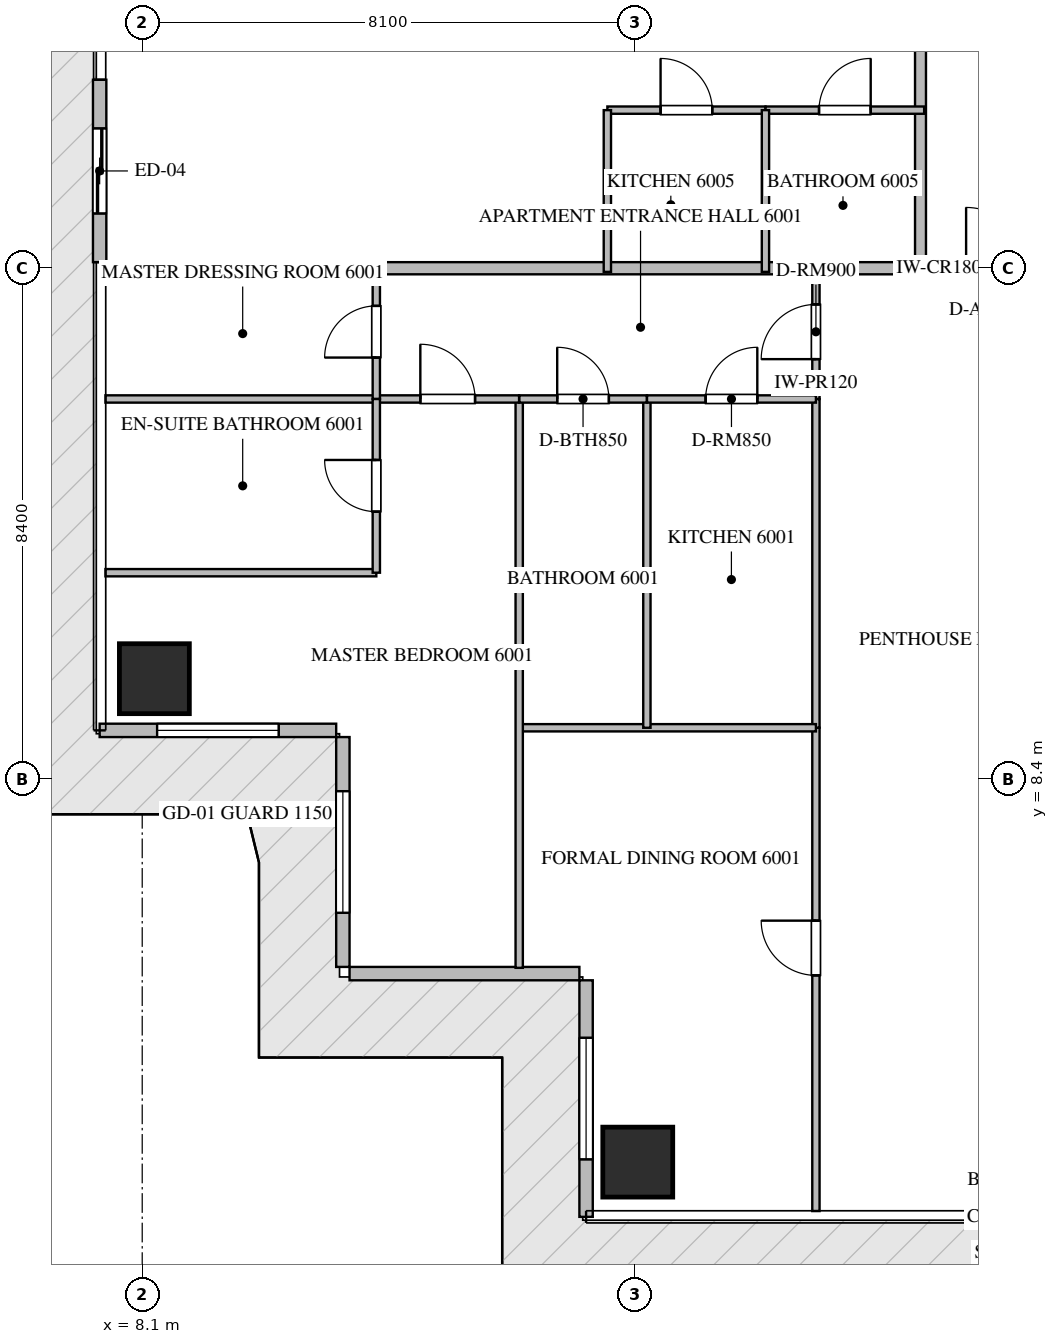
"""IFC4 building model, lengths in metres.
Left out: names, types, materials, properties, quantities, classifications, styles, units other than length and angle.
Written with IfcOpenShell. Run it as: python <this file> out.ifc"""

import sys

from ifc_helpers import new_model, si_unit, direction, frame, frame_2d, origin, origin_2d, place, context, subcontext, project, spatial, rectangle, extrude, source, transform, mapped, element, fill, save


model = new_model("IFC4")
c1 = context("Model", 3, precision=1e-05, world=origin(), true_north=direction((0.0, 1.0)))
c2 = subcontext(c1, "Body", "Model", "MODEL_VIEW")
j1 = project(units=[si_unit("LENGTHUNIT", "METRE"), si_unit("PLANEANGLEUNIT", "RADIAN")], contexts=[c1])
p1 = place(None, origin())
s1 = spatial("IfcSite", under=j1, at=p1, CompositionType="ELEMENT")
p2 = place(p1, origin())
s2 = spatial("IfcBuilding", under=s1, at=p2, CompositionType="ELEMENT")
p3 = place(p2, frame((0.0, 0.0, 241.25)))
s3 = spatial("IfcBuildingStorey", under=s2, at=p3, CompositionType="ELEMENT", Elevation=241.25)
m1 = source(origin(), c2, "Body", "SweptSolid", [
    extrude(rectangle(XDim=1.15, YDim=1.15, at=origin_2d()), origin(), (0.0, 0.0, 1.0), 3.85),
])
for number, where, z_axis, x_axis in (
    (1, (16.25, 2.1, -0.26), (0.0, 0.0, 1.0), (1.0, 0.0, 0.0)),
    (2, (8.3, 10.05, -0.26), (0.0, 0.0, 1.0), (1.0, 0.0, 0.0)),
):
    element("IfcColumn", number, at=place(p3, frame(where, z_axis=z_axis, x_axis=x_axis)), inside=s3, PredefinedType="COLUMN", context=c2, shape_type="MappedRepresentation", body=[
        mapped(m1, transform((0.0, 0.0, 0.0), scale=1.0)),
    ])
p4 = place(p3, frame((7.4, 19.9, 0.0), z_axis=(0.0, 0.0, 1.0), x_axis=(0.0, -1.0, 0.0)))
e3 = element("IfcWall", 3, at=p4, inside=s3, PredefinedType="ELEMENTEDWALL", context=c2, shape_type="SweptSolid", body=[
    extrude(rectangle(XDim=3.0, YDim=0.22, at=frame_2d((1.5, 0.0))), origin(), (0.0, 0.0, 1.0), 3.575),
])
p5 = place(p4, frame((0.8, 0.0, 0.0)))
e4 = element("IfcOpeningElement", 4, at=p5, cuts=e3, PredefinedType="OPENING", context=c2, shape_type="SweptSolid", body=[
    extrude(rectangle(XDim=1.4, YDim=2.25, at=frame_2d((0.7, 1.125))), frame((0.0, 0.12, 0.0), z_axis=(0.0, -1.0, 0.0), x_axis=(1.0, 0.0, 0.0)), (0.0, 0.0, 1.0), 0.24),
])
p6 = place(p3, frame((7.4, 9.2, 0.0), z_axis=(0.0, 0.0, 1.0), x_axis=(1.0, 0.0, 0.0)))
e5 = element("IfcWall", 5, at=p6, inside=s3, PredefinedType="ELEMENTEDWALL", context=c2, shape_type="SweptSolid", body=[
    extrude(rectangle(XDim=3.89, YDim=0.22, at=frame_2d((1.945, 0.0))), origin(), (0.0, 0.0, 1.0), 3.575),
])
p7 = place(p6, frame((0.945, 0.0, 0.65)))
e6 = element("IfcOpeningElement", 6, at=p7, cuts=e5, PredefinedType="OPENING", context=c2, shape_type="SweptSolid", body=[
    extrude(rectangle(XDim=2.0, YDim=2.2, at=frame_2d((1.0, 1.1))), frame((0.0, 0.12, 0.0), z_axis=(0.0, -1.0, 0.0), x_axis=(1.0, 0.0, 0.0)), (0.0, 0.0, 1.0), 0.24),
])
p8 = place(p3, frame((11.4, 9.09, 0.0), z_axis=(0.0, 0.0, 1.0), x_axis=(0.0, -1.0, 0.0)))
e7 = element("IfcWall", 7, at=p8, inside=s3, PredefinedType="ELEMENTEDWALL", context=c2, shape_type="SweptSolid", body=[
    extrude(rectangle(XDim=3.78, YDim=0.22, at=frame_2d((1.89, 0.0))), origin(), (0.0, 0.0, 1.0), 3.575),
])
p9 = place(p8, frame((0.89, 0.0, 0.65)))
e8 = element("IfcOpeningElement", 8, at=p9, cuts=e7, PredefinedType="OPENING", context=c2, shape_type="SweptSolid", body=[
    extrude(rectangle(XDim=2.0, YDim=2.2, at=frame_2d((1.0, 1.1))), frame((0.0, 0.12, 0.0), z_axis=(0.0, -1.0, 0.0), x_axis=(1.0, 0.0, 0.0)), (0.0, 0.0, 1.0), 0.24),
])
p10 = place(p3, frame((11.51, 5.2, 0.0), z_axis=(0.0, 0.0, 1.0), x_axis=(1.0, 0.0, 0.0)))
e9 = element("IfcWall", 9, at=p10, inside=s3, PredefinedType="ELEMENTEDWALL", context=c2, shape_type="SweptSolid", body=[
    extrude(rectangle(XDim=3.78, YDim=0.22, at=frame_2d((1.89, 0.0))), origin(), (0.0, 0.0, 1.0), 3.575),
])
p11 = place(p3, frame((15.4, 5.09, 0.0), z_axis=(0.0, 0.0, 1.0), x_axis=(0.0, -1.0, 0.0)))
e10 = element("IfcWall", 10, at=p11, inside=s3, PredefinedType="ELEMENTEDWALL", context=c2, shape_type="SweptSolid", body=[
    extrude(rectangle(XDim=3.89, YDim=0.22, at=frame_2d((1.945, 0.0))), origin(), (0.0, 0.0, 1.0), 3.575),
])
p12 = place(p11, frame((0.945, 0.0, 0.65)))
e11 = element("IfcOpeningElement", 11, at=p12, cuts=e10, PredefinedType="OPENING", context=c2, shape_type="SweptSolid", body=[
    extrude(rectangle(XDim=2.0, YDim=2.2, at=frame_2d((1.0, 1.1))), frame((0.0, 0.12, 0.0), z_axis=(0.0, -1.0, 0.0), x_axis=(1.0, 0.0, 0.0)), (0.0, 0.0, 1.0), 0.24),
])
p13 = place(p3, frame((7.482, 16.8, 0.0), z_axis=(0.0, 0.0, 1.0), x_axis=(1.0, 0.0, 0.0)))
e12 = element("IfcWall", 12, at=p13, inside=s3, PredefinedType="PARTITIONING", context=c2, shape_type="SweptSolid", body=[
    extrude(rectangle(XDim=13.418, YDim=0.2, at=frame_2d((6.709, 0.0))), origin(), (0.0, 0.0, 1.0), 3.59),
])
p14 = place(p3, frame((20.902, 16.8, 0.0), z_axis=(0.0, 0.0, 1.0), x_axis=(1.0, 0.0, 0.0)))
e13 = element("IfcWall", 13, at=p14, inside=s3, PredefinedType="PARTITIONING", context=c2, shape_type="SweptSolid", body=[
    extrude(rectangle(XDim=2.496, YDim=0.18, at=frame_2d((1.248, 0.0))), origin(), (0.0, 0.0, 1.0), 3.59),
])
p15 = place(p14, frame((0.748, 0.0, 0.0)))
e14 = element("IfcOpeningElement", 14, at=p15, cuts=e13, PredefinedType="OPENING", context=c2, shape_type="SweptSolid", body=[
    extrude(rectangle(XDim=1.0, YDim=2.15, at=frame_2d((0.5, 1.075))), frame((0.0, 0.1, 0.0), z_axis=(0.0, -1.0, 0.0), x_axis=(1.0, 0.0, 0.0)), (0.0, 0.0, 1.0), 0.2),
])
p16 = place(p3, frame((20.9, 16.8, 0.0), z_axis=(0.0, 0.0, 1.0), x_axis=(0.0, 1.0, 0.0)))
e15 = element("IfcWall", 15, at=p16, inside=s3, PredefinedType="PARTITIONING", context=c2, shape_type="SweptSolid", body=[
    extrude(rectangle(XDim=16.8, YDim=0.18, at=frame_2d((8.4, 0.0))), origin(), (0.0, 0.0, 1.0), 3.59),
])
p17 = place(p16, frame((4.993, 0.0, 0.0)))
e16 = element("IfcOpeningElement", 16, at=p17, cuts=e15, PredefinedType="OPENING", context=c2, shape_type="SweptSolid", body=[
    extrude(rectangle(XDim=1.0, YDim=2.15, at=frame_2d((0.5, 1.075))), frame((0.0, 0.1, 0.0), z_axis=(0.0, -1.0, 0.0), x_axis=(1.0, 0.0, 0.0)), (0.0, 0.0, 1.0), 0.2),
])
p18 = place(p16, frame((13.351, 0.0, 0.0)))
e17 = element("IfcOpeningElement", 17, at=p18, cuts=e15, PredefinedType="OPENING", context=c2, shape_type="SweptSolid", body=[
    extrude(rectangle(XDim=1.0, YDim=2.15, at=frame_2d((0.5, 1.075))), frame((0.0, 0.1, 0.0), z_axis=(0.0, -1.0, 0.0), x_axis=(1.0, 0.0, 0.0)), (0.0, 0.0, 1.0), 0.2),
])
p19 = place(p3, frame((19.18, 14.65, 0.0), z_axis=(0.0, 0.0, 1.0), x_axis=(0.0, 1.0, 0.0)))
e18 = element("IfcWall", 18, at=p19, inside=s3, PredefinedType="PARTITIONING", context=c2, shape_type="SweptSolid", body=[
    extrude(rectangle(XDim=2.21, YDim=0.12, at=frame_2d((1.105, 0.0))), origin(), (0.0, 0.0, 1.0), 3.59),
])
p20 = place(p19, frame((0.655, 0.0, 0.0)))
e19 = element("IfcOpeningElement", 19, at=p20, cuts=e18, PredefinedType="OPENING", context=c2, shape_type="SweptSolid", body=[
    extrude(rectangle(XDim=0.9, YDim=2.1, at=frame_2d((0.45, 1.05))), frame((0.0, 0.07, 0.0), z_axis=(0.0, -1.0, 0.0), x_axis=(1.0, 0.0, 0.0)), (0.0, 0.0, 1.0), 0.14),
])
p21 = place(p3, frame((19.18, 1.295, 0.0), z_axis=(0.0, 0.0, 1.0), x_axis=(0.0, 1.0, 0.0)))
e20 = element("IfcWall", 20, at=p21, inside=s3, PredefinedType="PARTITIONING", context=c2, shape_type="SweptSolid", body=[
    extrude(rectangle(XDim=7.948, YDim=0.12, at=frame_2d((3.974, 0.0))), origin(), (0.0, 0.0, 1.0), 3.59),
])
p22 = place(p21, frame((3.876, 0.0, 0.0)))
e21 = element("IfcOpeningElement", 21, at=p22, cuts=e20, PredefinedType="OPENING", context=c2, shape_type="SweptSolid", body=[
    extrude(rectangle(XDim=0.9, YDim=2.1, at=frame_2d((0.45, 1.05))), frame((0.0, 0.07, 0.0), z_axis=(0.0, -1.0, 0.0), x_axis=(1.0, 0.0, 0.0)), (0.0, 0.0, 1.0), 0.14),
])
p23 = place(p3, frame((19.18, 9.245, 0.0), z_axis=(0.0, 0.0, 1.0), x_axis=(0.0, 1.0, 0.0)))
e22 = element("IfcWall", 22, at=p23, inside=s3, PredefinedType="PARTITIONING", context=c2, shape_type="SweptSolid", body=[
    extrude(rectangle(XDim=5.403, YDim=0.12, at=frame_2d((2.701, 0.0))), origin(), (0.0, 0.0, 1.0), 3.59),
])
p24 = place(p3, frame((14.3, 9.243, 0.0), z_axis=(0.0, 0.0, 1.0), x_axis=(1.0, 0.0, 0.0)))
e23 = element("IfcWall", 23, at=p24, inside=s3, PredefinedType="PARTITIONING", context=c2, shape_type="SweptSolid", body=[
    extrude(rectangle(XDim=4.88, YDim=0.12, at=frame_2d((2.44, 0.0))), origin(), (0.0, 0.0, 1.0), 3.59),
])
p25 = place(p3, frame((14.3, 5.295, 0.0), z_axis=(0.0, 0.0, 1.0), x_axis=(0.0, 1.0, 0.0)))
e24 = element("IfcWall", 24, at=p25, inside=s3, PredefinedType="PARTITIONING", context=c2, shape_type="SweptSolid", body=[
    extrude(rectangle(XDim=9.355, YDim=0.12, at=frame_2d((4.677, 0.0))), origin(), (0.0, 0.0, 1.0), 3.59),
])
p26 = place(p3, frame((16.4, 9.243, 0.0), z_axis=(0.0, 0.0, 1.0), x_axis=(0.0, 1.0, 0.0)))
e25 = element("IfcWall", 25, at=p26, inside=s3, PredefinedType="PARTITIONING", context=c2, shape_type="SweptSolid", body=[
    extrude(rectangle(XDim=5.407, YDim=0.12, at=frame_2d((2.704, 0.0))), origin(), (0.0, 0.0, 1.0), 3.122),
])
p27 = place(p3, frame((14.3, 14.65, 0.0), z_axis=(0.0, 0.0, 1.0), x_axis=(1.0, 0.0, 0.0)))
e26 = element("IfcWall", 26, at=p27, inside=s3, PredefinedType="PARTITIONING", context=c2, shape_type="SweptSolid", body=[
    extrude(rectangle(XDim=2.1, YDim=0.12, at=frame_2d((1.05, 0.0))), origin(), (0.0, 0.0, 1.0), 3.59),
])
p28 = place(p27, frame((0.625, 0.0, 0.0)))
e27 = element("IfcOpeningElement", 27, at=p28, cuts=e26, PredefinedType="OPENING", context=c2, shape_type="SweptSolid", body=[
    extrude(rectangle(XDim=0.85, YDim=2.1, at=frame_2d((0.425, 1.05))), frame((0.0, 0.07, 0.0), z_axis=(0.0, -1.0, 0.0), x_axis=(1.0, 0.0, 0.0)), (0.0, 0.0, 1.0), 0.14),
])
p29 = place(p3, frame((16.402, 14.65, 0.0), z_axis=(0.0, 0.0, 1.0), x_axis=(1.0, 0.0, 0.0)))
e28 = element("IfcWall", 28, at=p29, inside=s3, PredefinedType="PARTITIONING", context=c2, shape_type="SweptSolid", body=[
    extrude(rectangle(XDim=2.778, YDim=0.12, at=frame_2d((1.389, 0.0))), origin(), (0.0, 0.0, 1.0), 3.59),
])
p30 = place(p29, frame((0.964, 0.0, 0.0)))
e29 = element("IfcOpeningElement", 29, at=p30, cuts=e28, PredefinedType="OPENING", context=c2, shape_type="SweptSolid", body=[
    extrude(rectangle(XDim=0.85, YDim=2.1, at=frame_2d((0.425, 1.05))), frame((0.0, 0.07, 0.0), z_axis=(0.0, -1.0, 0.0), x_axis=(1.0, 0.0, 0.0)), (0.0, 0.0, 1.0), 0.14),
])
p31 = place(p3, frame((11.95, 14.65, 0.0), z_axis=(0.0, 0.0, 1.0), x_axis=(1.0, 0.0, 0.0)))
e30 = element("IfcWall", 30, at=p31, inside=s3, PredefinedType="PARTITIONING", context=c2, shape_type="SweptSolid", body=[
    extrude(rectangle(XDim=2.348, YDim=0.12, at=frame_2d((1.174, 0.0))), origin(), (0.0, 0.0, 1.0), 3.59),
])
p32 = place(p31, frame((0.724, 0.0, 0.0)))
e31 = element("IfcOpeningElement", 31, at=p32, cuts=e30, PredefinedType="OPENING", context=c2, shape_type="SweptSolid", body=[
    extrude(rectangle(XDim=0.9, YDim=2.1, at=frame_2d((0.45, 1.05))), frame((0.0, 0.07, 0.0), z_axis=(0.0, -1.0, 0.0), x_axis=(1.0, 0.0, 0.0)), (0.0, 0.0, 1.0), 0.14),
])
p33 = place(p3, frame((7.495, 11.793, 0.0), z_axis=(0.0, 0.0, 1.0), x_axis=(1.0, 0.0, 0.0)))
e32 = element("IfcWall", 32, at=p33, inside=s3, PredefinedType="PARTITIONING", context=c2, shape_type="SweptSolid", body=[
    extrude(rectangle(XDim=4.455, YDim=0.12, at=frame_2d((2.228, 0.0))), origin(), (0.0, 0.0, 1.0), 3.59),
])
p34 = place(p3, frame((7.495, 14.65, 0.0), z_axis=(0.0, 0.0, 1.0), x_axis=(1.0, 0.0, 0.0)))
e33 = element("IfcWall", 33, at=p34, inside=s3, PredefinedType="PARTITIONING", context=c2, shape_type="SweptSolid", body=[
    extrude(rectangle(XDim=4.453, YDim=0.12, at=frame_2d((2.227, 0.0))), origin(), (0.0, 0.0, 1.0), 3.59),
])
p35 = place(p3, frame((11.95, 11.793, 0.0), z_axis=(0.0, 0.0, 1.0), x_axis=(0.0, 1.0, 0.0)))
e34 = element("IfcWall", 34, at=p35, inside=s3, PredefinedType="PARTITIONING", context=c2, shape_type="SweptSolid", body=[
    extrude(rectangle(XDim=2.857, YDim=0.12, at=frame_2d((1.428, 0.0))), origin(), (0.0, 0.0, 1.0), 3.59),
])
p36 = place(p35, frame((1.004, 0.0, 0.0)))
e35 = element("IfcOpeningElement", 35, at=p36, cuts=e34, PredefinedType="OPENING", context=c2, shape_type="SweptSolid", body=[
    extrude(rectangle(XDim=0.85, YDim=2.1, at=frame_2d((0.425, 1.05))), frame((0.0, 0.07, 0.0), z_axis=(0.0, -1.0, 0.0), x_axis=(1.0, 0.0, 0.0)), (0.0, 0.0, 1.0), 0.14),
])
p37 = place(p3, frame((11.95, 14.652, 0.0), z_axis=(0.0, 0.0, 1.0), x_axis=(0.0, 1.0, 0.0)))
e36 = element("IfcWall", 36, at=p37, inside=s3, PredefinedType="PARTITIONING", context=c2, shape_type="SweptSolid", body=[
    extrude(rectangle(XDim=2.208, YDim=0.12, at=frame_2d((1.104, 0.0))), origin(), (0.0, 0.0, 1.0), 3.59),
])
p38 = place(p37, frame((0.679, 0.0, 0.0)))
e37 = element("IfcOpeningElement", 37, at=p38, cuts=e36, PredefinedType="OPENING", context=c2, shape_type="SweptSolid", body=[
    extrude(rectangle(XDim=0.85, YDim=2.1, at=frame_2d((0.425, 1.05))), frame((0.0, 0.07, 0.0), z_axis=(0.0, -1.0, 0.0), x_axis=(1.0, 0.0, 0.0)), (0.0, 0.0, 1.0), 0.14),
])
p39 = place(p3, frame((15.75, 19.4, 0.0), z_axis=(0.0, 0.0, 1.0), x_axis=(1.0, 0.0, 0.0)))
e38 = element("IfcWall", 38, at=p39, inside=s3, PredefinedType="PARTITIONING", context=c2, shape_type="SweptSolid", body=[
    extrude(rectangle(XDim=2.6, YDim=0.12, at=frame_2d((1.3, 0.0))), origin(), (0.0, 0.0, 1.0), 3.59),
])
p40 = place(p39, frame((0.875, 0.0, 0.0)))
e39 = element("IfcOpeningElement", 39, at=p40, cuts=e38, PredefinedType="OPENING", context=c2, shape_type="SweptSolid", body=[
    extrude(rectangle(XDim=0.85, YDim=2.1, at=frame_2d((0.425, 1.05))), frame((0.0, 0.07, 0.0), z_axis=(0.0, -1.0, 0.0), x_axis=(1.0, 0.0, 0.0)), (0.0, 0.0, 1.0), 0.14),
])
p41 = place(p3, frame((18.352, 19.4, 0.0), z_axis=(0.0, 0.0, 1.0), x_axis=(1.0, 0.0, 0.0)))
e40 = element("IfcWall", 40, at=p41, inside=s3, PredefinedType="PARTITIONING", context=c2, shape_type="SweptSolid", body=[
    extrude(rectangle(XDim=2.608, YDim=0.12, at=frame_2d((1.304, 0.0))), origin(), (0.0, 0.0, 1.0), 3.59),
])
p42 = place(p41, frame((0.879, 0.0, 0.0)))
e41 = element("IfcOpeningElement", 41, at=p42, cuts=e40, PredefinedType="OPENING", context=c2, shape_type="SweptSolid", body=[
    extrude(rectangle(XDim=0.85, YDim=2.1, at=frame_2d((0.425, 1.05))), frame((0.0, 0.07, 0.0), z_axis=(0.0, -1.0, 0.0), x_axis=(1.0, 0.0, 0.0)), (0.0, 0.0, 1.0), 0.14),
])
for number, where, z_axis, x_axis in (
    (42, (18.35, 16.74, 0.0), (0.0, 0.0, 1.0), (0.0, 1.0, 0.0)),
    (43, (15.75, 16.74, 0.0), (0.0, 0.0, 1.0), (0.0, 1.0, 0.0)),
):
    element("IfcWall", number, at=place(p3, frame(where, z_axis=z_axis, x_axis=x_axis)), inside=s3, PredefinedType="PARTITIONING", context=c2, shape_type="SweptSolid", body=[
        extrude(rectangle(XDim=2.66, YDim=0.12, at=frame_2d((1.33, 0.0))), origin(), (0.0, 0.0, 1.0), 3.59),
    ])
m2 = source(origin(), c2, "Body", "SweptSolid", [
    extrude(rectangle(XDim=1.4, YDim=2.25, at=frame_2d((0.7, 1.125))), frame((0.0, 0.025, 0.0), z_axis=(0.0, -1.0, 0.0), x_axis=(1.0, 0.0, 0.0)), (0.0, 0.0, 1.0), 0.05),
])
p43 = place(p5, origin())
e44 = element("IfcDoor", 44, at=p43, inside=s3, OperationType="SLIDING_TO_LEFT", PredefinedType="DOOR", context=c2, shape_type="MappedRepresentation", body=[
    mapped(m2, transform((0.0, 0.0, 0.0), scale=1.0)),
])
fill(e4, e44)
m3 = source(origin(), c2, "Body", "SweptSolid", [
    extrude(rectangle(XDim=2.0, YDim=2.2, at=frame_2d((1.0, 1.1))), frame((0.0, 0.03, 0.0), z_axis=(0.0, -1.0, 0.0), x_axis=(1.0, 0.0, 0.0)), (0.0, 0.0, 1.0), 0.06),
])
p44 = place(p7, origin())
e45 = element("IfcWindow", 45, at=p44, inside=s3, PartitioningType="SINGLE_PANEL", PredefinedType="WINDOW", context=c2, shape_type="MappedRepresentation", body=[
    mapped(m3, transform((0.0, 0.0, 0.0), scale=1.0)),
])
fill(e6, e45)
p45 = place(p9, origin())
e46 = element("IfcWindow", 46, at=p45, inside=s3, PartitioningType="SINGLE_PANEL", PredefinedType="WINDOW", context=c2, shape_type="MappedRepresentation", body=[
    mapped(m3, transform((0.0, 0.0, 0.0), scale=1.0)),
])
fill(e8, e46)
p46 = place(p12, origin())
e47 = element("IfcWindow", 47, at=p46, inside=s3, PartitioningType="SINGLE_PANEL", PredefinedType="WINDOW", context=c2, shape_type="MappedRepresentation", body=[
    mapped(m3, transform((0.0, 0.0, 0.0), scale=1.0)),
])
fill(e11, e47)
m4 = source(origin(), c2, "Body", "SweptSolid", [
    extrude(rectangle(XDim=1.0, YDim=2.15, at=frame_2d((0.5, 1.075))), frame((0.0, 0.025, 0.0), z_axis=(0.0, -1.0, 0.0), x_axis=(1.0, 0.0, 0.0)), (0.0, 0.0, 1.0), 0.05),
])
p47 = place(p15, origin())
e48 = element("IfcDoor", 48, at=p47, inside=s3, OperationType="SINGLE_SWING_LEFT", PredefinedType="DOOR", context=c2, shape_type="MappedRepresentation", body=[
    mapped(m4, transform((0.0, 0.0, 0.0), scale=1.0)),
])
fill(e14, e48)
m5 = source(origin(), c2, "Body", "SweptSolid", [
    extrude(rectangle(XDim=0.9, YDim=2.1, at=frame_2d((0.45, 1.05))), frame((0.0, 0.025, 0.0), z_axis=(0.0, -1.0, 0.0), x_axis=(1.0, 0.0, 0.0)), (0.0, 0.0, 1.0), 0.05),
])
p48 = place(p20, origin())
e49 = element("IfcDoor", 49, at=p48, inside=s3, OperationType="SINGLE_SWING_LEFT", PredefinedType="DOOR", context=c2, shape_type="MappedRepresentation", body=[
    mapped(m5, transform((0.0, 0.0, 0.0), scale=1.0)),
])
fill(e19, e49)
p49 = place(p22, origin())
e50 = element("IfcDoor", 50, at=p49, inside=s3, OperationType="SINGLE_SWING_RIGHT", PredefinedType="DOOR", context=c2, shape_type="MappedRepresentation", body=[
    mapped(m5, transform((0.0, 0.0, 0.0), scale=1.0)),
])
fill(e21, e50)
m6 = source(origin(), c2, "Body", "SweptSolid", [
    extrude(rectangle(XDim=0.85, YDim=2.1, at=frame_2d((0.425, 1.05))), frame((0.0, 0.025, 0.0), z_axis=(0.0, -1.0, 0.0), x_axis=(1.0, 0.0, 0.0)), (0.0, 0.0, 1.0), 0.05),
])
p50 = place(p28, origin())
e51 = element("IfcDoor", 51, at=p50, inside=s3, OperationType="SINGLE_SWING_LEFT", PredefinedType="DOOR", context=c2, shape_type="MappedRepresentation", body=[
    mapped(m6, transform((0.0, 0.0, 0.0), scale=1.0)),
])
fill(e27, e51)
p51 = place(p30, origin())
e52 = element("IfcDoor", 52, at=p51, inside=s3, OperationType="SINGLE_SWING_RIGHT", PredefinedType="DOOR", context=c2, shape_type="MappedRepresentation", body=[
    mapped(m6, transform((0.0, 0.0, 0.0), scale=1.0)),
])
fill(e29, e52)
p52 = place(p32, origin())
e53 = element("IfcDoor", 53, at=p52, inside=s3, OperationType="SINGLE_SWING_LEFT", PredefinedType="DOOR", context=c2, shape_type="MappedRepresentation", body=[
    mapped(m5, transform((0.0, 0.0, 0.0), scale=1.0)),
])
fill(e31, e53)
p53 = place(p36, origin())
e54 = element("IfcDoor", 54, at=p53, inside=s3, OperationType="SINGLE_SWING_RIGHT", PredefinedType="DOOR", context=c2, shape_type="MappedRepresentation", body=[
    mapped(m6, transform((0.0, 0.0, 0.0), scale=1.0)),
])
fill(e35, e54)
p54 = place(p38, origin())
e55 = element("IfcDoor", 55, at=p54, inside=s3, OperationType="SINGLE_SWING_LEFT", PredefinedType="DOOR", context=c2, shape_type="MappedRepresentation", body=[
    mapped(m6, transform((0.0, 0.0, 0.0), scale=1.0)),
])
fill(e37, e55)
p55 = place(p40, origin())
e56 = element("IfcDoor", 56, at=p55, inside=s3, OperationType="SINGLE_SWING_LEFT", PredefinedType="DOOR", context=c2, shape_type="MappedRepresentation", body=[
    mapped(m6, transform((0.0, 0.0, 0.0), scale=1.0)),
])
fill(e39, e56)
p56 = place(p42, origin())
e57 = element("IfcDoor", 57, at=p56, inside=s3, OperationType="SINGLE_SWING_RIGHT", PredefinedType="DOOR", context=c2, shape_type="MappedRepresentation", body=[
    mapped(m6, transform((0.0, 0.0, 0.0), scale=1.0)),
])
fill(e41, e57)
save(model, sys.argv[1])
